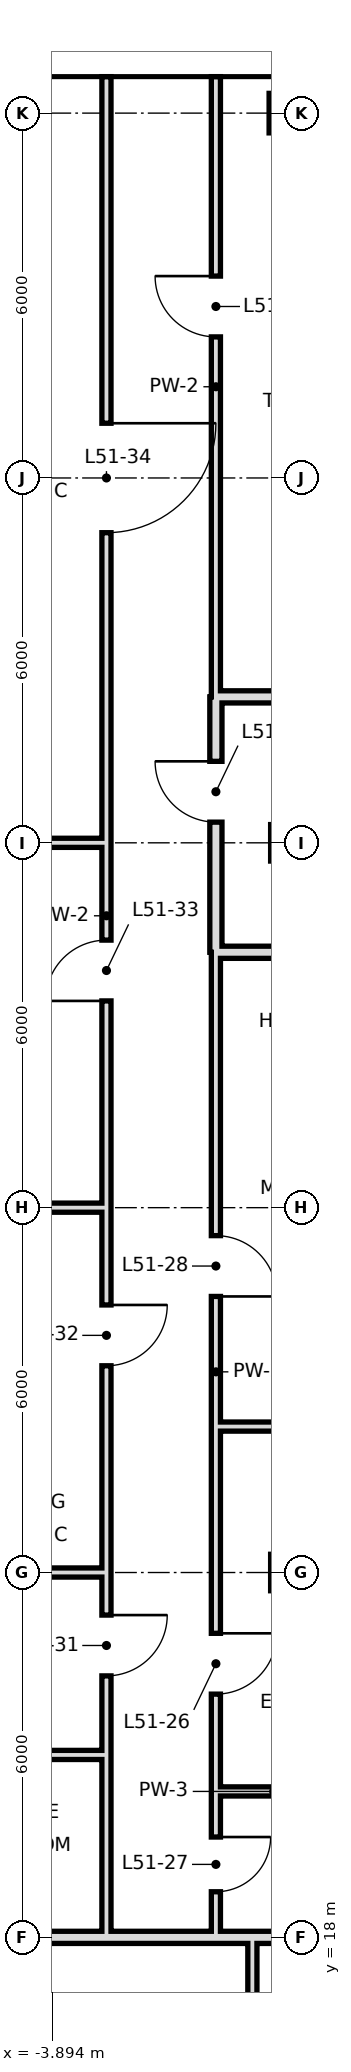
"""IFC4 building model, lengths in metres.
Left out: names, types, materials, properties, quantities, classifications, styles, units other than length and angle.
Written with IfcOpenShell. Run it as: python <this file> out.ifc"""

import sys

from ifc_helpers import new_model, si_unit, direction, frame, frame_2d, origin, origin_2d, place, context, subcontext, project, spatial, rectangle, hollow_rectangle, extrude, element, fill, save


model = new_model("IFC4")
c1 = context("Model", 3, precision=1e-05, world=origin(), true_north=direction((0.0, 1.0)))
c2 = subcontext(c1, "Body", "Model", "MODEL_VIEW")
j1 = project(units=[si_unit("LENGTHUNIT", "METRE"), si_unit("PLANEANGLEUNIT", "RADIAN")], contexts=[c1])
p1 = place(None, origin())
s1 = spatial("IfcSite", under=j1, at=p1, CompositionType="ELEMENT")
p2 = place(p1, origin())
s2 = spatial("IfcBuilding", under=s1, at=p2, CompositionType="ELEMENT")
p3 = place(p2, frame((0.0, 0.0, 219.0)))
s3 = spatial("IfcBuildingStorey", under=s2, at=p3, CompositionType="ELEMENT", Elevation=219.0)
p4 = place(p3, frame((0.0, 48.0, 0.0), z_axis=(0.0, 0.0, 1.0), x_axis=(1.0, 0.0, 0.0)))
e1 = element("IfcColumn", 1, at=p4, inside=s3, PredefinedType="COLUMN", context=c2, shape_type="SweptSolid", body=[
    extrude(hollow_rectangle(XDim=0.65, YDim=0.65, WallThickness=0.032, at=origin_2d()), origin(), (0.0, 0.0, 1.0), 3.6),
])
p5 = place(p3, frame((-0.6, 10.8, 0.0), z_axis=(0.0, 0.0, 1.0), x_axis=(0.0, 1.0, 0.0)))
e2 = element("IfcWall", 2, at=p5, inside=s3, PredefinedType="PARTITIONING", context=c2, shape_type="SweptSolid", body=[
    extrude(rectangle(XDim=7.2, YDim=0.15, at=frame_2d((3.6, 0.0))), origin(), (0.0, 0.0, 1.0), 3.42),
])
p6 = place(p3, frame((-1.2, 34.2, 0.0), z_axis=(0.0, 0.0, 1.0), x_axis=(0.0, 1.0, 0.0)))
e3 = element("IfcWall", 3, at=p6, inside=s3, PredefinedType="SOLIDWALL", context=c2, shape_type="SweptSolid", body=[
    extrude(rectangle(XDim=4.2, YDim=0.2, at=frame_2d((2.1, 0.0))), origin(), (0.0, 0.0, 1.0), 2.72),
])
p7 = place(p6, frame((2.14, 0.0, 0.0)))
e4 = element("IfcOpeningElement", 4, at=p7, cuts=e3, PredefinedType="OPENING", context=c2, shape_type="SweptSolid", body=[
    extrude(rectangle(XDim=1.0, YDim=2.4, at=frame_2d((0.5, 1.2))), frame((0.0, 0.11, 0.0), z_axis=(0.0, -1.0, 0.0), x_axis=(1.0, 0.0, 0.0)), (0.0, 0.0, 1.0), 0.22),
])
p8 = place(p3, frame((-1.2, 20.4, 0.0), z_axis=(0.0, 0.0, 1.0), x_axis=(0.0, 1.0, 0.0)))
e5 = element("IfcWall", 5, at=p8, inside=s3, PredefinedType="PARTITIONING", context=c2, shape_type="SweptSolid", body=[
    extrude(rectangle(XDim=13.8, YDim=0.15, at=frame_2d((6.9, 0.0))), origin(), (0.0, 0.0, 1.0), 3.42),
])
p9 = place(p8, frame((1.6, 0.0, 0.0)))
e6 = element("IfcOpeningElement", 6, at=p9, cuts=e5, PredefinedType="OPENING", context=c2, shape_type="SweptSolid", body=[
    extrude(rectangle(XDim=1.0, YDim=2.4, at=frame_2d((0.5, 1.2))), frame((0.0, 0.085, 0.0), z_axis=(0.0, -1.0, 0.0), x_axis=(1.0, 0.0, 0.0)), (0.0, 0.0, 1.0), 0.17),
])
p10 = place(p8, frame((8.14, 0.0, 0.0)))
e7 = element("IfcOpeningElement", 7, at=p10, cuts=e5, PredefinedType="OPENING", context=c2, shape_type="SweptSolid", body=[
    extrude(rectangle(XDim=1.0, YDim=2.4, at=frame_2d((0.5, 1.2))), frame((0.0, 0.085, 0.0), z_axis=(0.0, -1.0, 0.0), x_axis=(1.0, 0.0, 0.0)), (0.0, 0.0, 1.0), 0.17),
])
p11 = place(p3, frame((-1.2, 38.4, 0.0), z_axis=(0.0, 0.0, 1.0), x_axis=(0.0, 1.0, 0.0)))
e8 = element("IfcWall", 8, at=p11, inside=s3, PredefinedType="PARTITIONING", context=c2, shape_type="SweptSolid", body=[
    extrude(rectangle(XDim=10.2, YDim=0.15, at=frame_2d((5.1, 0.0))), origin(), (0.0, 0.0, 1.0), 3.42),
])
p12 = place(p11, frame((5.92, 0.0, 0.0)))
e9 = element("IfcOpeningElement", 9, at=p12, cuts=e8, PredefinedType="OPENING", context=c2, shape_type="SweptSolid", body=[
    extrude(rectangle(XDim=1.0, YDim=2.4, at=frame_2d((0.5, 1.2))), frame((0.0, 0.085, 0.0), z_axis=(0.0, -1.0, 0.0), x_axis=(1.0, 0.0, 0.0)), (0.0, 0.0, 1.0), 0.17),
])
p13 = place(p3, frame((-1.2, 18.0, 0.0), z_axis=(0.0, 0.0, 1.0), x_axis=(0.0, 1.0, 0.0)))
e10 = element("IfcWall", 10, at=p13, inside=s3, PredefinedType="PARTITIONING", context=c2, shape_type="SweptSolid", body=[
    extrude(rectangle(XDim=2.4, YDim=0.15, at=frame_2d((1.2, 0.0))), origin(), (0.0, 0.0, 1.0), 3.42),
])
p14 = place(p13, frame((0.75, 0.0, 0.0)))
e11 = element("IfcOpeningElement", 11, at=p14, cuts=e10, PredefinedType="OPENING", context=c2, shape_type="SweptSolid", body=[
    extrude(rectangle(XDim=0.9, YDim=2.4, at=frame_2d((0.45, 1.2))), frame((0.0, 0.085, 0.0), z_axis=(0.0, -1.0, 0.0), x_axis=(1.0, 0.0, 0.0)), (0.0, 0.0, 1.0), 0.17),
])
p15 = place(p3, frame((-3.0, 21.0, 0.0), z_axis=(0.0, 0.0, 1.0), x_axis=(0.0, 1.0, 0.0)))
e12 = element("IfcWall", 12, at=p15, inside=s3, PredefinedType="PARTITIONING", context=c2, shape_type="SweptSolid", body=[
    extrude(rectangle(XDim=27.6, YDim=0.15, at=frame_2d((13.8, 0.0))), origin(), (0.0, 0.0, 1.0), 3.42),
])
p16 = place(p15, frame((1.3, 0.0, 0.0)))
e13 = element("IfcOpeningElement", 13, at=p16, cuts=e12, PredefinedType="OPENING", context=c2, shape_type="SweptSolid", body=[
    extrude(rectangle(XDim=1.0, YDim=2.4, at=frame_2d((0.5, 1.2))), frame((0.0, 0.085, 0.0), z_axis=(0.0, -1.0, 0.0), x_axis=(1.0, 0.0, 0.0)), (0.0, 0.0, 1.0), 0.17),
])
p17 = place(p15, frame((6.4, 0.0, 0.0)))
e14 = element("IfcOpeningElement", 14, at=p17, cuts=e12, PredefinedType="OPENING", context=c2, shape_type="SweptSolid", body=[
    extrude(rectangle(XDim=1.0, YDim=2.4, at=frame_2d((0.5, 1.2))), frame((0.0, 0.085, 0.0), z_axis=(0.0, -1.0, 0.0), x_axis=(1.0, 0.0, 0.0)), (0.0, 0.0, 1.0), 0.17),
])
p18 = place(p15, frame((12.4, 0.0, 0.0)))
e15 = element("IfcOpeningElement", 15, at=p18, cuts=e12, PredefinedType="OPENING", context=c2, shape_type="SweptSolid", body=[
    extrude(rectangle(XDim=1.0, YDim=2.4, at=frame_2d((0.5, 1.2))), frame((0.0, 0.085, 0.0), z_axis=(0.0, -1.0, 0.0), x_axis=(1.0, 0.0, 0.0)), (0.0, 0.0, 1.0), 0.17),
])
p19 = place(p15, frame((20.1, 0.0, 0.0)))
e16 = element("IfcOpeningElement", 16, at=p19, cuts=e12, PredefinedType="OPENING", context=c2, shape_type="SweptSolid", body=[
    extrude(rectangle(XDim=1.8, YDim=2.4, at=frame_2d((0.9, 1.2))), frame((0.0, 0.085, 0.0), z_axis=(0.0, -1.0, 0.0), x_axis=(1.0, 0.0, 0.0)), (0.0, 0.0, 1.0), 0.17),
])
p20 = place(p3, frame((-3.0, 18.0, 0.0), z_axis=(0.0, 0.0, 1.0), x_axis=(0.0, 1.0, 0.0)))
e17 = element("IfcWall", 17, at=p20, inside=s3, PredefinedType="PARTITIONING", context=c2, shape_type="SweptSolid", body=[
    extrude(rectangle(XDim=3.0, YDim=0.15, at=frame_2d((1.5, 0.0))), origin(), (0.0, 0.0, 1.0), 3.42),
])
p21 = place(p3, frame((-12.6, 18.0, 0.0), z_axis=(0.0, 0.0, 1.0), x_axis=(1.0, 0.0, 0.0)))
e18 = element("IfcWall", 18, at=p21, inside=s3, PredefinedType="SOLIDWALL", context=c2, shape_type="SweptSolid", body=[
    extrude(rectangle(XDim=14.4, YDim=0.2, at=frame_2d((7.2, 0.0))), origin(), (0.0, 0.0, 1.0), 2.72),
])
p22 = place(p3, frame((-1.2, 20.4, 0.0), z_axis=(0.0, 0.0, 1.0), x_axis=(1.0, 0.0, 0.0)))
e19 = element("IfcWall", 19, at=p22, inside=s3, PredefinedType="PARTITIONING", context=c2, shape_type="SweptSolid", body=[
    extrude(rectangle(XDim=4.3, YDim=0.15, at=frame_2d((2.15, 0.0))), origin(), (0.0, 0.0, 1.0), 3.42),
])
p23 = place(p3, frame((-6.0, 21.0, 0.0), z_axis=(0.0, 0.0, 1.0), x_axis=(1.0, 0.0, 0.0)))
e20 = element("IfcWall", 20, at=p23, inside=s3, PredefinedType="PARTITIONING", context=c2, shape_type="SweptSolid", body=[
    extrude(rectangle(XDim=3.0, YDim=0.15, at=frame_2d((1.5, 0.0))), origin(), (0.0, 0.0, 1.0), 3.42),
])
p24 = place(p3, frame((-12.0, 24.0, 0.0), z_axis=(0.0, 0.0, 1.0), x_axis=(1.0, 0.0, 0.0)))
e21 = element("IfcWall", 21, at=p24, inside=s3, PredefinedType="PARTITIONING", context=c2, shape_type="SweptSolid", body=[
    extrude(rectangle(XDim=9.0, YDim=0.15, at=frame_2d((4.5, 0.0))), origin(), (0.0, 0.0, 1.0), 2.72),
])
p25 = place(p3, frame((-1.2, 26.4, 0.0), z_axis=(0.0, 0.0, 1.0), x_axis=(1.0, 0.0, 0.0)))
e22 = element("IfcWall", 22, at=p25, inside=s3, PredefinedType="PARTITIONING", context=c2, shape_type="SweptSolid", body=[
    extrude(rectangle(XDim=4.3, YDim=0.15, at=frame_2d((2.15, 0.0))), origin(), (0.0, 0.0, 1.0), 3.42),
])
p26 = place(p3, frame((-12.6, 30.0, 0.0), z_axis=(0.0, 0.0, 1.0), x_axis=(1.0, 0.0, 0.0)))
e23 = element("IfcWall", 23, at=p26, inside=s3, PredefinedType="PARTITIONING", context=c2, shape_type="SweptSolid", body=[
    extrude(rectangle(XDim=9.6, YDim=0.15, at=frame_2d((4.8, 0.0))), origin(), (0.0, 0.0, 1.0), 2.72),
])
p27 = place(p3, frame((-1.2, 34.2, 0.0), z_axis=(0.0, 0.0, 1.0), x_axis=(1.0, 0.0, 0.0)))
e24 = element("IfcWall", 24, at=p27, inside=s3, PredefinedType="SOLIDWALL", context=c2, shape_type="SweptSolid", body=[
    extrude(rectangle(XDim=4.3, YDim=0.2, at=frame_2d((2.15, 0.0))), origin(), (0.0, 0.0, 1.0), 2.72),
])
p28 = place(p3, frame((-12.0, 36.0, 0.0), z_axis=(0.0, 0.0, 1.0), x_axis=(1.0, 0.0, 0.0)))
e25 = element("IfcWall", 25, at=p28, inside=s3, PredefinedType="PARTITIONING", context=c2, shape_type="SweptSolid", body=[
    extrude(rectangle(XDim=9.0, YDim=0.15, at=frame_2d((4.5, 0.0))), origin(), (0.0, 0.0, 1.0), 2.72),
])
p29 = place(p3, frame((-1.2, 38.4, 0.0), z_axis=(0.0, 0.0, 1.0), x_axis=(1.0, 0.0, 0.0)))
e26 = element("IfcWall", 26, at=p29, inside=s3, PredefinedType="SOLIDWALL", context=c2, shape_type="SweptSolid", body=[
    extrude(rectangle(XDim=4.3, YDim=0.2, at=frame_2d((2.15, 0.0))), origin(), (0.0, 0.0, 1.0), 2.72),
])
p30 = place(p9, origin())
e27 = element("IfcDoor", 27, at=p30, inside=s3, OperationType="SINGLE_SWING_RIGHT", PredefinedType="DOOR", context=c2, shape_type="SweptSolid", body=[
    extrude(rectangle(XDim=1.0, YDim=2.4, at=frame_2d((0.5, 1.2))), frame((0.0, 0.025, 0.0), z_axis=(0.0, -1.0, 0.0), x_axis=(1.0, 0.0, 0.0)), (0.0, 0.0, 1.0), 0.05),
])
fill(e6, e27)
p31 = place(p14, origin())
e28 = element("IfcDoor", 28, at=p31, inside=s3, OperationType="SINGLE_SWING_RIGHT", PredefinedType="DOOR", context=c2, shape_type="SweptSolid", body=[
    extrude(rectangle(XDim=0.9, YDim=2.4, at=frame_2d((0.45, 1.2))), frame((0.0, 0.025, 0.0), z_axis=(0.0, -1.0, 0.0), x_axis=(1.0, 0.0, 0.0)), (0.0, 0.0, 1.0), 0.05),
])
fill(e11, e28)
p32 = place(p10, frame((1.0, 0.0, 0.0), z_axis=(0.0, 0.0, 1.0), x_axis=(-1.0, 0.0, 0.0)))
e29 = element("IfcDoor", 29, at=p32, inside=s3, OperationType="SINGLE_SWING_RIGHT", PredefinedType="DOOR", context=c2, shape_type="SweptSolid", body=[
    extrude(rectangle(XDim=1.0, YDim=2.4, at=frame_2d((0.5, 1.2))), frame((0.0, 0.025, 0.0), z_axis=(0.0, -1.0, 0.0), x_axis=(1.0, 0.0, 0.0)), (0.0, 0.0, 1.0), 0.05),
])
fill(e7, e29)
p33 = place(p7, frame((1.0, 0.0, 0.0), z_axis=(0.0, 0.0, 1.0), x_axis=(-1.0, 0.0, 0.0)))
e30 = element("IfcDoor", 30, at=p33, inside=s3, OperationType="SINGLE_SWING_LEFT", PredefinedType="DOOR", context=c2, shape_type="SweptSolid", body=[
    extrude(rectangle(XDim=1.0, YDim=2.4, at=frame_2d((0.5, 1.2))), frame((0.0, 0.025, 0.0), z_axis=(0.0, -1.0, 0.0), x_axis=(1.0, 0.0, 0.0)), (0.0, 0.0, 1.0), 0.05),
])
fill(e4, e30)
p34 = place(p12, frame((1.0, 0.0, 0.0), z_axis=(0.0, 0.0, 1.0), x_axis=(-1.0, 0.0, 0.0)))
e31 = element("IfcDoor", 31, at=p34, inside=s3, OperationType="SINGLE_SWING_LEFT", PredefinedType="DOOR", context=c2, shape_type="SweptSolid", body=[
    extrude(rectangle(XDim=1.0, YDim=2.4, at=frame_2d((0.5, 1.2))), frame((0.0, 0.025, 0.0), z_axis=(0.0, -1.0, 0.0), x_axis=(1.0, 0.0, 0.0)), (0.0, 0.0, 1.0), 0.05),
])
fill(e9, e31)
p35 = place(p16, origin())
e32 = element("IfcDoor", 32, at=p35, inside=s3, OperationType="SINGLE_SWING_RIGHT", PredefinedType="DOOR", context=c2, shape_type="SweptSolid", body=[
    extrude(rectangle(XDim=1.0, YDim=2.4, at=frame_2d((0.5, 1.2))), frame((0.0, 0.025, 0.0), z_axis=(0.0, -1.0, 0.0), x_axis=(1.0, 0.0, 0.0)), (0.0, 0.0, 1.0), 0.05),
])
fill(e13, e32)
p36 = place(p17, origin())
e33 = element("IfcDoor", 33, at=p36, inside=s3, OperationType="SINGLE_SWING_RIGHT", PredefinedType="DOOR", context=c2, shape_type="SweptSolid", body=[
    extrude(rectangle(XDim=1.0, YDim=2.4, at=frame_2d((0.5, 1.2))), frame((0.0, 0.025, 0.0), z_axis=(0.0, -1.0, 0.0), x_axis=(1.0, 0.0, 0.0)), (0.0, 0.0, 1.0), 0.05),
])
fill(e14, e33)
p37 = place(p18, origin())
e34 = element("IfcDoor", 34, at=p37, inside=s3, OperationType="SINGLE_SWING_LEFT", PredefinedType="DOOR", context=c2, shape_type="SweptSolid", body=[
    extrude(rectangle(XDim=1.0, YDim=2.4, at=frame_2d((0.5, 1.2))), frame((0.0, 0.025, 0.0), z_axis=(0.0, -1.0, 0.0), x_axis=(1.0, 0.0, 0.0)), (0.0, 0.0, 1.0), 0.05),
])
fill(e15, e34)
p38 = place(p19, origin())
e35 = element("IfcDoor", 35, at=p38, inside=s3, OperationType="SINGLE_SWING_RIGHT", PredefinedType="DOOR", context=c2, shape_type="SweptSolid", body=[
    extrude(rectangle(XDim=1.8, YDim=2.4, at=frame_2d((0.9, 1.2))), frame((0.0, 0.025, 0.0), z_axis=(0.0, -1.0, 0.0), x_axis=(1.0, 0.0, 0.0)), (0.0, 0.0, 1.0), 0.05),
])
fill(e16, e35)
save(model, sys.argv[1])
